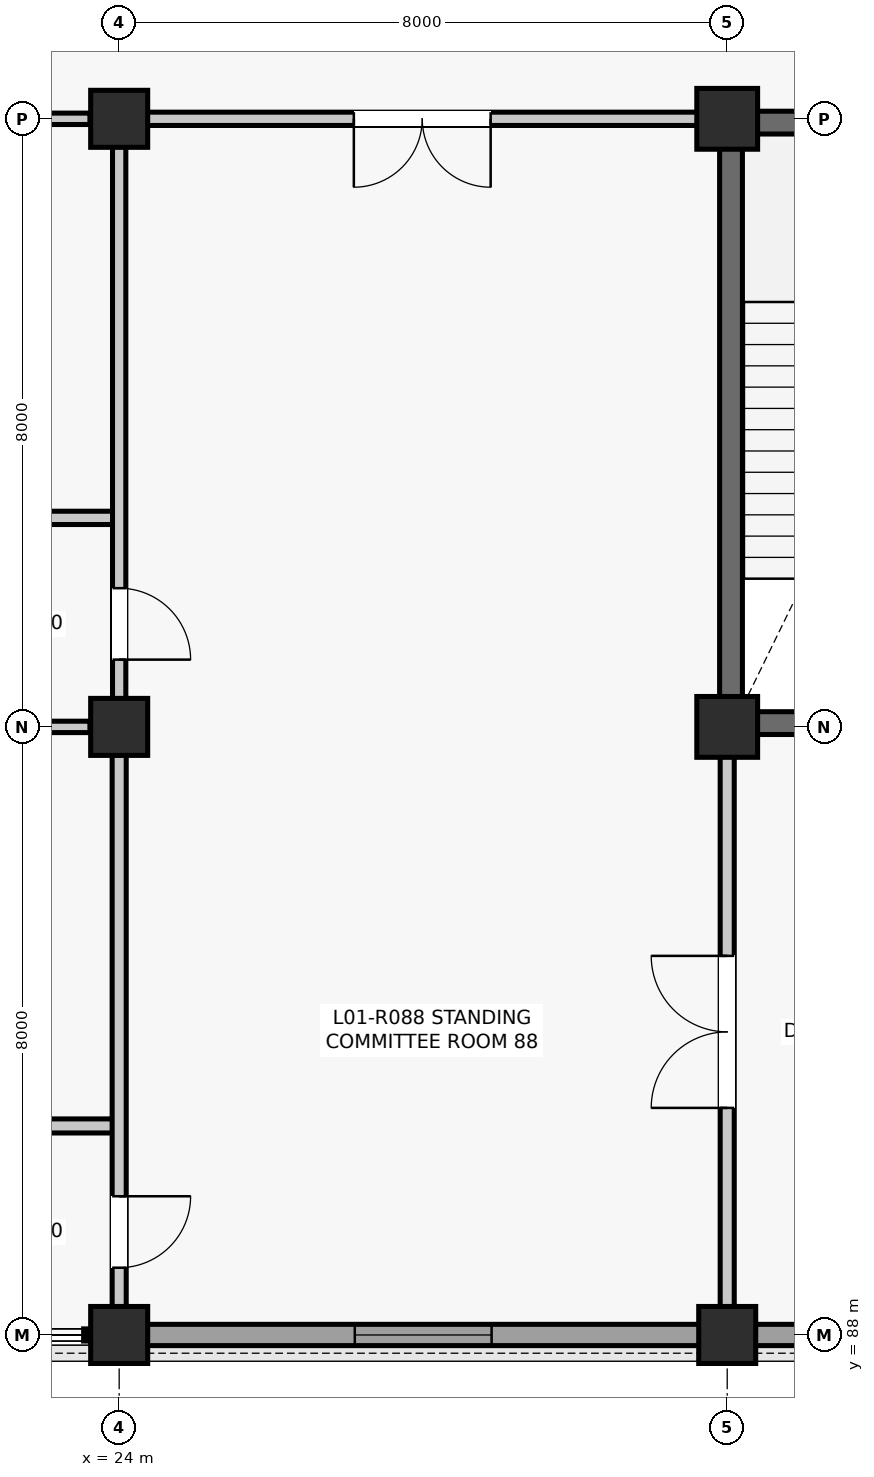
"""IFC4 building model, lengths in metres.
Left out: names, types, materials, properties, quantities, classifications, styles, units other than length and angle.
Written with IfcOpenShell. Run it as: python <this file> out.ifc"""

import sys

from ifc_helpers import new_model, si_unit, direction, frame, frame_2d, origin, origin_2d, place, context, subcontext, project, spatial, rectangle, extrude, element, fill, save


model = new_model("IFC4")
c1 = context("Model", 3, precision=1e-05, world=origin(), true_north=direction((0.0, 1.0)))
c2 = subcontext(c1, "Body", "Model", "MODEL_VIEW")
j1 = project(units=[si_unit("LENGTHUNIT", "METRE"), si_unit("PLANEANGLEUNIT", "RADIAN")], contexts=[c1])
p1 = place(None, origin())
s1 = spatial("IfcSite", under=j1, at=p1, CompositionType="ELEMENT")
p2 = place(p1, origin())
s2 = spatial("IfcBuilding", under=s1, at=p2, CompositionType="ELEMENT")
p3 = place(p2, frame((0.0, 0.0, 5.28)))
s3 = spatial("IfcBuildingStorey", under=s2, at=p3, CompositionType="ELEMENT", Elevation=5.28)
for number, where, z_axis, x_axis in (
    (1, (24.0, 88.0, 0.0), (0.0, 0.0, 1.0), (1.0, 0.0, 0.0)),
    (2, (24.0, 96.0, 0.0), (0.0, 0.0, 1.0), (1.0, 0.0, 0.0)),
    (3, (24.0, 104.0, 0.0), (0.0, 0.0, 1.0), (1.0, 0.0, 0.0)),
    (4, (32.0, 88.0, 0.0), (0.0, 0.0, 1.0), (1.0, 0.0, 0.0)),
):
    element("IfcColumn", number, at=place(p3, frame(where, z_axis=z_axis, x_axis=x_axis)), inside=s3, PredefinedType="COLUMN", context=c2, shape_type="SweptSolid", body=[
        extrude(rectangle(XDim=0.75, YDim=0.75, at=origin_2d()), origin(), (0.0, 0.0, 1.0), 4.62),
    ])
for number, where, z_axis, x_axis in (
    (5, (32.0, 96.0, 0.0), (0.0, 0.0, 1.0), (1.0, 0.0, 0.0)),
    (6, (32.0, 104.0, 0.0), (0.0, 0.0, 1.0), (1.0, 0.0, 0.0)),
):
    element("IfcColumn", number, at=place(p3, frame(where, z_axis=z_axis, x_axis=x_axis)), inside=s3, PredefinedType="COLUMN", context=c2, shape_type="SweptSolid", body=[
        extrude(rectangle(XDim=0.8, YDim=0.8, at=origin_2d()), origin(), (0.0, 0.0, 1.0), 4.62),
    ])
p4 = place(p3, frame((24.36, 88.0, 0.0), z_axis=(0.0, 0.0, 1.0), x_axis=(1.0, 0.0, 0.0)))
e7 = element("IfcWall", 7, at=p4, inside=s3, PredefinedType="SOLIDWALL", context=c2, shape_type="SweptSolid", body=[
    extrude(rectangle(XDim=7.28, YDim=0.28, at=frame_2d((3.64, 0.0))), origin(), (0.0, 0.0, 1.0), 3.977),
])
p5 = place(p4, frame((2.74, 0.0, 0.9)))
e8 = element("IfcOpeningElement", 8, at=p5, cuts=e7, PredefinedType="OPENING", context=c2, shape_type="SweptSolid", body=[
    extrude(rectangle(XDim=1.8, YDim=2.3, at=frame_2d((0.9, 1.15))), frame((0.0, 0.15, 0.0), z_axis=(0.0, -1.0, 0.0), x_axis=(1.0, 0.0, 0.0)), (0.0, 0.0, 1.0), 0.3),
])
p6 = place(p3, frame((32.36, 88.0, 0.0), z_axis=(0.0, 0.0, 1.0), x_axis=(1.0, 0.0, 0.0)))
e9 = element("IfcWall", 9, at=p6, inside=s3, PredefinedType="SOLIDWALL", context=c2, shape_type="SweptSolid", body=[
    extrude(rectangle(XDim=7.28, YDim=0.28, at=frame_2d((3.64, 0.0))), origin(), (0.0, 0.0, 1.0), 3.91),
])
p7 = place(p6, frame((2.665, 0.0, 0.9)))
e10 = element("IfcOpeningElement", 10, at=p7, cuts=e9, PredefinedType="OPENING", context=c2, shape_type="SweptSolid", body=[
    extrude(rectangle(XDim=1.95, YDim=2.45, at=frame_2d((0.975, 1.225))), frame((0.0, 0.15, 0.0), z_axis=(0.0, -1.0, 0.0), x_axis=(1.0, 0.0, 0.0)), (0.0, 0.0, 1.0), 0.3),
])
for number, where, z_axis, x_axis in (
    (11, (32.05, 96.29, 0.0), (0.0, 0.0, 1.0), (0.0, 1.0, 0.0)),
    (12, (32.29, 103.95, 0.0), (0.0, 0.0, 1.0), (1.0, 0.0, 0.0)),
):
    element("IfcWall", number, at=place(p3, frame(where, z_axis=z_axis, x_axis=x_axis)), inside=s3, PredefinedType="SHEAR", context=c2, shape_type="SweptSolid", body=[
        extrude(rectangle(XDim=7.42, YDim=0.3, at=frame_2d((3.71, 0.0))), origin(), (0.0, 0.0, 1.0), 4.335),
    ])
p8 = place(p3, frame((32.29, 96.05, 0.0), z_axis=(0.0, 0.0, 1.0), x_axis=(1.0, 0.0, 0.0)))
e13 = element("IfcWall", 13, at=p8, inside=s3, PredefinedType="SHEAR", context=c2, shape_type="SweptSolid", body=[
    extrude(rectangle(XDim=3.86, YDim=0.3, at=frame_2d((1.93, 0.0))), origin(), (0.0, 0.0, 1.0), 4.335),
])
p9 = place(p3, frame((18.7, 90.75, 0.0), z_axis=(0.0, 0.0, 1.0), x_axis=(1.0, 0.0, 0.0)))
e14 = element("IfcWall", 14, at=p9, inside=s3, PredefinedType="PARTITIONING", context=c2, shape_type="SweptSolid", body=[
    extrude(rectangle(XDim=5.28, YDim=0.185, at=frame_2d((2.64, 0.0))), origin(), (0.0, 0.0, 1.0), 3.781),
])
p10 = place(p9, frame((2.115, 0.0, 0.0)))
e15 = element("IfcOpeningElement", 15, at=p10, cuts=e14, PredefinedType="OPENING", context=c2, shape_type="SweptSolid", body=[
    extrude(rectangle(XDim=1.05, YDim=2.15, at=frame_2d((0.525, 1.075))), frame((0.0, 0.103, 0.0), z_axis=(0.0, -1.0, 0.0), x_axis=(1.0, 0.0, 0.0)), (0.0, 0.0, 1.0), 0.205),
])
p11 = place(p3, frame((18.75, 96.0, 0.0), z_axis=(0.0, 0.0, 1.0), x_axis=(1.0, 0.0, 0.0)))
e16 = element("IfcWall", 16, at=p11, inside=s3, PredefinedType="PARTITIONING", context=c2, shape_type="SweptSolid", body=[
    extrude(rectangle(XDim=4.865, YDim=0.15, at=frame_2d((2.433, 0.0))), origin(), (0.0, 0.0, 1.0), 3.771),
])
p12 = place(p3, frame((18.7, 98.75, 0.0), z_axis=(0.0, 0.0, 1.0), x_axis=(1.0, 0.0, 0.0)))
e17 = element("IfcWall", 17, at=p12, inside=s3, PredefinedType="PARTITIONING", context=c2, shape_type="SweptSolid", body=[
    extrude(rectangle(XDim=5.28, YDim=0.175, at=frame_2d((2.64, 0.0))), origin(), (0.0, 0.0, 1.0), 3.851),
])
p13 = place(p12, frame((2.14, 0.0, 0.0)))
e18 = element("IfcOpeningElement", 18, at=p13, cuts=e17, PredefinedType="OPENING", context=c2, shape_type="SweptSolid", body=[
    extrude(rectangle(XDim=1.0, YDim=2.15, at=frame_2d((0.5, 1.075))), frame((0.0, 0.097, 0.0), z_axis=(0.0, -1.0, 0.0), x_axis=(1.0, 0.0, 0.0)), (0.0, 0.0, 1.0), 0.195),
])
p14 = place(p3, frame((18.75, 104.0, 0.0), z_axis=(0.0, 0.0, 1.0), x_axis=(1.0, 0.0, 0.0)))
e19 = element("IfcWall", 19, at=p14, inside=s3, PredefinedType="PARTITIONING", context=c2, shape_type="SweptSolid", body=[
    extrude(rectangle(XDim=4.865, YDim=0.15, at=frame_2d((2.433, 0.0))), origin(), (0.0, 0.0, 1.0), 3.781),
])
p15 = place(p3, frame((24.0, 88.365, 0.0), z_axis=(0.0, 0.0, 1.0), x_axis=(0.0, 1.0, 0.0)))
e20 = element("IfcWall", 20, at=p15, inside=s3, PredefinedType="PARTITIONING", context=c2, shape_type="SweptSolid", body=[
    extrude(rectangle(XDim=7.27, YDim=0.185, at=frame_2d((3.635, 0.0))), origin(), (0.0, 0.0, 1.0), 3.781),
])
p16 = place(p15, frame((0.52, 0.0, 0.0)))
e21 = element("IfcOpeningElement", 21, at=p16, cuts=e20, PredefinedType="OPENING", context=c2, shape_type="SweptSolid", body=[
    extrude(rectangle(XDim=0.94, YDim=2.12, at=frame_2d((0.47, 1.06))), frame((0.0, 0.103, 0.0), z_axis=(0.0, -1.0, 0.0), x_axis=(1.0, 0.0, 0.0)), (0.0, 0.0, 1.0), 0.205),
])
p17 = place(p3, frame((24.0, 96.365, 0.0), z_axis=(0.0, 0.0, 1.0), x_axis=(0.0, 1.0, 0.0)))
e22 = element("IfcWall", 22, at=p17, inside=s3, PredefinedType="PARTITIONING", context=c2, shape_type="SweptSolid", body=[
    extrude(rectangle(XDim=7.27, YDim=0.175, at=frame_2d((3.635, 0.0))), origin(), (0.0, 0.0, 1.0), 3.851),
])
p18 = place(p17, frame((0.52, 0.0, 0.0)))
e23 = element("IfcOpeningElement", 23, at=p18, cuts=e22, PredefinedType="OPENING", context=c2, shape_type="SweptSolid", body=[
    extrude(rectangle(XDim=0.94, YDim=2.12, at=frame_2d((0.47, 1.06))), frame((0.0, 0.097, 0.0), z_axis=(0.0, -1.0, 0.0), x_axis=(1.0, 0.0, 0.0)), (0.0, 0.0, 1.0), 0.195),
])
p19 = place(p3, frame((32.0, 88.365, 0.0), z_axis=(0.0, 0.0, 1.0), x_axis=(0.0, 1.0, 0.0)))
e24 = element("IfcWall", 24, at=p19, inside=s3, PredefinedType="PARTITIONING", context=c2, shape_type="SweptSolid", body=[
    extrude(rectangle(XDim=7.245, YDim=0.185, at=frame_2d((3.623, 0.0))), origin(), (0.0, 0.0, 1.0), 3.851),
])
p20 = place(p19, frame((2.623, 0.0, 0.0)))
e25 = element("IfcOpeningElement", 25, at=p20, cuts=e24, PredefinedType="OPENING", context=c2, shape_type="SweptSolid", body=[
    extrude(rectangle(XDim=2.0, YDim=2.4, at=frame_2d((1.0, 1.2))), frame((0.0, 0.103, 0.0), z_axis=(0.0, -1.0, 0.0), x_axis=(1.0, 0.0, 0.0)), (0.0, 0.0, 1.0), 0.205),
])
p21 = place(p3, frame((24.365, 104.0, 0.0), z_axis=(0.0, 0.0, 1.0), x_axis=(1.0, 0.0, 0.0)))
e26 = element("IfcWall", 26, at=p21, inside=s3, PredefinedType="PARTITIONING", context=c2, shape_type="SweptSolid", body=[
    extrude(rectangle(XDim=7.245, YDim=0.175, at=frame_2d((3.623, 0.0))), origin(), (0.0, 0.0, 1.0), 3.712),
])
p22 = place(p21, frame((2.722, 0.0, 0.0)))
e27 = element("IfcOpeningElement", 27, at=p22, cuts=e26, PredefinedType="OPENING", context=c2, shape_type="SweptSolid", body=[
    extrude(rectangle(XDim=1.8, YDim=2.35, at=frame_2d((0.9, 1.175))), frame((0.0, 0.097, 0.0), z_axis=(0.0, -1.0, 0.0), x_axis=(1.0, 0.0, 0.0)), (0.0, 0.0, 1.0), 0.195),
])
p23 = place(p5, origin())
e28 = element("IfcWindow", 28, at=p23, inside=s3, PartitioningType="SINGLE_PANEL", PredefinedType="WINDOW", context=c2, shape_type="SweptSolid", body=[
    extrude(rectangle(XDim=1.8, YDim=2.3, at=frame_2d((0.9, 1.15))), frame((0.0, 0.03, 0.0), z_axis=(0.0, -1.0, 0.0), x_axis=(1.0, 0.0, 0.0)), (0.0, 0.0, 1.0), 0.06),
])
fill(e8, e28)
p24 = place(p16, frame((0.94, 0.0, 0.0), z_axis=(0.0, 0.0, 1.0), x_axis=(-1.0, 0.0, 0.0)))
e29 = element("IfcDoor", 29, at=p24, inside=s3, OperationType="SINGLE_SWING_RIGHT", PredefinedType="DOOR", context=c2, shape_type="SweptSolid", body=[
    extrude(rectangle(XDim=0.94, YDim=2.12, at=frame_2d((0.47, 1.06))), frame((0.0, 0.025, 0.0), z_axis=(0.0, -1.0, 0.0), x_axis=(1.0, 0.0, 0.0)), (0.0, 0.0, 1.0), 0.05),
])
fill(e21, e29)
p25 = place(p18, frame((0.94, 0.0, 0.0), z_axis=(0.0, 0.0, 1.0), x_axis=(-1.0, 0.0, 0.0)))
e30 = element("IfcDoor", 30, at=p25, inside=s3, OperationType="SINGLE_SWING_LEFT", PredefinedType="DOOR", context=c2, shape_type="SweptSolid", body=[
    extrude(rectangle(XDim=0.94, YDim=2.12, at=frame_2d((0.47, 1.06))), frame((0.0, 0.025, 0.0), z_axis=(0.0, -1.0, 0.0), x_axis=(1.0, 0.0, 0.0)), (0.0, 0.0, 1.0), 0.05),
])
fill(e23, e30)
p26 = place(p20, origin())
e31 = element("IfcDoor", 31, at=p26, inside=s3, OperationType="DOUBLE_DOOR_SINGLE_SWING", PredefinedType="DOOR", context=c2, shape_type="SweptSolid", body=[
    extrude(rectangle(XDim=2.0, YDim=2.4, at=frame_2d((1.0, 1.2))), frame((0.0, 0.025, 0.0), z_axis=(0.0, -1.0, 0.0), x_axis=(1.0, 0.0, 0.0)), (0.0, 0.0, 1.0), 0.05),
])
fill(e25, e31)
p27 = place(p22, frame((1.8, 0.0, 0.0), z_axis=(0.0, 0.0, 1.0), x_axis=(-1.0, 0.0, 0.0)))
e32 = element("IfcDoor", 32, at=p27, inside=s3, OperationType="DOUBLE_DOOR_SINGLE_SWING", PredefinedType="DOOR", context=c2, shape_type="SweptSolid", body=[
    extrude(rectangle(XDim=1.8, YDim=2.35, at=frame_2d((0.9, 1.175))), frame((0.0, 0.025, 0.0), z_axis=(0.0, -1.0, 0.0), x_axis=(1.0, 0.0, 0.0)), (0.0, 0.0, 1.0), 0.05),
])
fill(e27, e32)
save(model, sys.argv[1])
